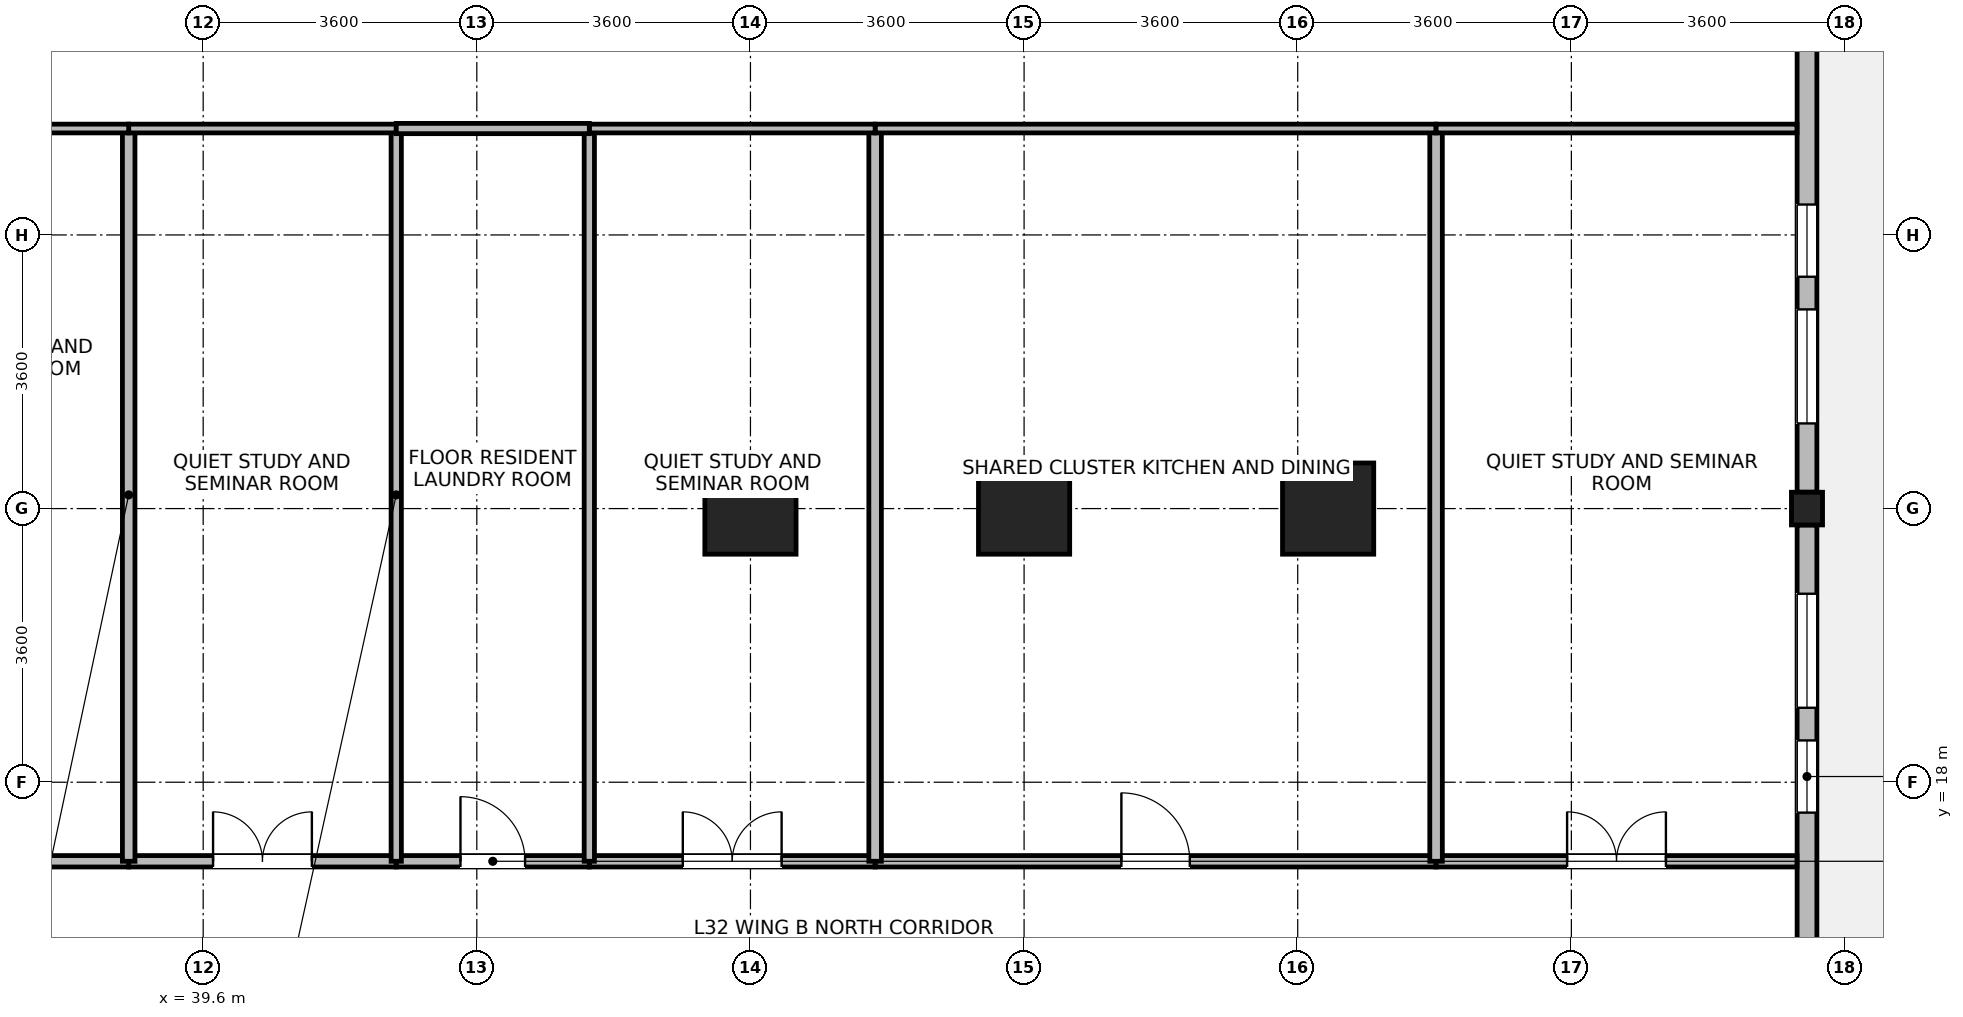
"""IFC4 building model, lengths in metres.
Left out: names, types, materials, properties, quantities, classifications, styles, units other than length and angle.
Written with IfcOpenShell. Run it as: python <this file> out.ifc"""

import sys

from ifc_helpers import new_model, si_unit, direction, frame, frame_2d, origin, origin_2d, place, context, subcontext, project, spatial, rectangle, i_section, extrude, source, transform, mapped, element, fill, save


model = new_model("IFC4")
c1 = context("Model", 3, precision=1e-05, world=origin(), true_north=direction((0.0, 1.0)))
c2 = subcontext(c1, "Body", "Model", "MODEL_VIEW")
j1 = project(units=[si_unit("LENGTHUNIT", "METRE"), si_unit("PLANEANGLEUNIT", "RADIAN")], contexts=[c1])
p1 = place(None, origin())
s1 = spatial("IfcSite", under=j1, at=p1, CompositionType="ELEMENT")
p2 = place(p1, origin())
s2 = spatial("IfcBuilding", under=s1, at=p2, CompositionType="ELEMENT")
p3 = place(p2, frame((0.0, 0.0, 126.7)))
s3 = spatial("IfcBuildingStorey", under=s2, at=p3, CompositionType="ELEMENT", Elevation=126.7)
m1 = source(origin(), c2, "Body", "SweptSolid", [
    extrude(rectangle(XDim=1.2, YDim=1.2, at=origin_2d()), origin(), (0.0, 0.0, 1.0), 3.7),
])
for number, where, z_axis, x_axis in (
    (1, (46.8, 21.6, 0.0), (0.0, 0.0, 1.0), (1.0, 0.0, 0.0)),
    (2, (50.4, 21.6, 0.0), (0.0, 0.0, 1.0), (1.0, 0.0, 0.0)),
    (3, (54.4, 21.6, 0.0), (0.0, 0.0, 1.0), (1.0, 0.0, 0.0)),
):
    element("IfcColumn", number, at=place(p3, frame(where, z_axis=z_axis, x_axis=x_axis)), inside=s3, PredefinedType="COLUMN", context=c2, shape_type="MappedRepresentation", body=[
        mapped(m1, transform((0.0, 0.0, 0.0), x_axis=(1.0, 0.0, 0.0), y_axis=(0.0, 1.0, 0.0), z_axis=(0.0, 0.0, 1.0), scale=1.0)),
    ])
m2 = source(origin(), c2, "Body", "SweptSolid", [
    extrude(i_section(OverallWidth=0.409, OverallDepth=0.43, WebThickness=0.024, FlangeThickness=0.033, FilletRadius=0.015, at=origin_2d()), origin(), (0.0, 0.0, 1.0), 3.7),
])
p4 = place(p3, frame((60.7, 21.6, 0.0), z_axis=(0.0, 0.0, 1.0), x_axis=(1.0, 0.0, 0.0)))
e4 = element("IfcColumn", 4, at=p4, inside=s3, PredefinedType="COLUMN", context=c2, shape_type="MappedRepresentation", body=[
    mapped(m2, transform((0.0, 0.0, 0.0), x_axis=(1.0, 0.0, 0.0), y_axis=(0.0, 1.0, 0.0), z_axis=(0.0, 0.0, 1.0), scale=1.0)),
])
p5 = place(p3, frame((60.7, 21.384, 0.0), z_axis=(0.0, 0.0, 1.0), x_axis=(0.0, -1.0, 0.0)))
e5 = element("IfcWall", 5, at=p5, inside=s3, PredefinedType="STANDARD", context=c2, shape_type="SweptSolid", body=[
    extrude(rectangle(XDim=6.618, YDim=0.26, at=frame_2d((3.309, 0.0))), origin(), (0.0, 0.0, 1.0), 2.87),
])
p6 = place(p5, frame((0.905, 0.0, 0.85)))
e6 = element("IfcOpeningElement", 6, at=p6, cuts=e5, PredefinedType="OPENING", context=c2, shape_type="SweptSolid", body=[
    extrude(rectangle(XDim=1.5, YDim=1.85, at=frame_2d((0.75, 0.925))), frame((0.0, 0.14, 0.0), z_axis=(0.0, -1.0, 0.0), x_axis=(1.0, 0.0, 0.0)), (0.0, 0.0, 1.0), 0.28),
])
p7 = place(p5, frame((2.834, 0.0, 0.85)))
e7 = element("IfcOpeningElement", 7, at=p7, cuts=e5, PredefinedType="OPENING", context=c2, shape_type="SweptSolid", body=[
    extrude(rectangle(XDim=0.95, YDim=1.75, at=frame_2d((0.475, 0.875))), frame((0.0, 0.14, 0.0), z_axis=(0.0, -1.0, 0.0), x_axis=(1.0, 0.0, 0.0)), (0.0, 0.0, 1.0), 0.28),
])
p8 = place(p3, frame((60.7, 28.434, 0.0), z_axis=(0.0, 0.0, 1.0), x_axis=(0.0, -1.0, 0.0)))
e8 = element("IfcWall", 8, at=p8, inside=s3, PredefinedType="STANDARD", context=c2, shape_type="SweptSolid", body=[
    extrude(rectangle(XDim=6.618, YDim=0.26, at=frame_2d((3.309, 0.0))), origin(), (0.0, 0.0, 1.0), 2.87),
])
p9 = place(p8, frame((4.213, 0.0, 0.85)))
e9 = element("IfcOpeningElement", 9, at=p9, cuts=e8, PredefinedType="OPENING", context=c2, shape_type="SweptSolid", body=[
    extrude(rectangle(XDim=1.5, YDim=1.85, at=frame_2d((0.75, 0.925))), frame((0.0, 0.14, 0.0), z_axis=(0.0, -1.0, 0.0), x_axis=(1.0, 0.0, 0.0)), (0.0, 0.0, 1.0), 0.28),
])
p10 = place(p8, frame((2.834, 0.0, 0.85)))
e10 = element("IfcOpeningElement", 10, at=p10, cuts=e8, PredefinedType="OPENING", context=c2, shape_type="SweptSolid", body=[
    extrude(rectangle(XDim=0.95, YDim=1.75, at=frame_2d((0.475, 0.875))), frame((0.0, 0.14, 0.0), z_axis=(0.0, -1.0, 0.0), x_axis=(1.0, 0.0, 0.0)), (0.0, 0.0, 1.0), 0.28),
])
p11 = place(p3, frame((48.44, 16.96, 0.0), z_axis=(0.0, 0.0, 1.0), x_axis=(1.0, 0.0, 0.0)))
e11 = element("IfcWall", 11, at=p11, inside=s3, PredefinedType="PARTITIONING", context=c2, shape_type="SweptSolid", body=[
    extrude(rectangle(XDim=7.38, YDim=0.15, at=frame_2d((3.69, 0.0))), origin(), (0.0, 0.0, 1.0), 3.32),
])
p12 = place(p11, frame((3.24, 0.0, 0.0)))
e12 = element("IfcOpeningElement", 12, at=p12, cuts=e11, PredefinedType="OPENING", context=c2, shape_type="SweptSolid", body=[
    extrude(rectangle(XDim=0.9, YDim=2.08, at=frame_2d((0.45, 1.04))), frame((0.0, 0.085, 0.0), z_axis=(0.0, -1.0, 0.0), x_axis=(1.0, 0.0, 0.0)), (0.0, 0.0, 1.0), 0.17),
])
p13 = place(p3, frame((55.82, 16.96, 0.0), z_axis=(0.0, 0.0, 1.0), x_axis=(1.0, 0.0, 0.0)))
e13 = element("IfcWall", 13, at=p13, inside=s3, PredefinedType="PARTITIONING", context=c2, shape_type="SweptSolid", body=[
    extrude(rectangle(XDim=4.748, YDim=0.15, at=frame_2d((2.374, 0.0))), origin(), (0.0, 0.0, 1.0), 3.32),
])
p14 = place(p13, frame((1.724, 0.0, 0.0)))
e14 = element("IfcOpeningElement", 14, at=p14, cuts=e13, PredefinedType="OPENING", context=c2, shape_type="SweptSolid", body=[
    extrude(rectangle(XDim=1.3, YDim=2.12, at=frame_2d((0.65, 1.06))), frame((0.0, 0.085, 0.0), z_axis=(0.0, -1.0, 0.0), x_axis=(1.0, 0.0, 0.0)), (0.0, 0.0, 1.0), 0.17),
])
p15 = place(p3, frame((44.68, 16.96, 0.0), z_axis=(0.0, 0.0, 1.0), x_axis=(1.0, 0.0, 0.0)))
e15 = element("IfcWall", 15, at=p15, inside=s3, PredefinedType="PARTITIONING", context=c2, shape_type="SweptSolid", body=[
    extrude(rectangle(XDim=3.76, YDim=0.15, at=frame_2d((1.88, 0.0))), origin(), (0.0, 0.0, 1.0), 3.32),
])
p16 = place(p15, frame((1.23, 0.0, 0.0)))
e16 = element("IfcOpeningElement", 16, at=p16, cuts=e15, PredefinedType="OPENING", context=c2, shape_type="SweptSolid", body=[
    extrude(rectangle(XDim=1.3, YDim=2.12, at=frame_2d((0.65, 1.06))), frame((0.0, 0.085, 0.0), z_axis=(0.0, -1.0, 0.0), x_axis=(1.0, 0.0, 0.0)), (0.0, 0.0, 1.0), 0.17),
])
p17 = place(p3, frame((38.62, 16.96, 0.0), z_axis=(0.0, 0.0, 1.0), x_axis=(1.0, 0.0, 0.0)))
e17 = element("IfcWall", 17, at=p17, inside=s3, PredefinedType="PARTITIONING", context=c2, shape_type="SweptSolid", body=[
    extrude(rectangle(XDim=3.52, YDim=0.15, at=frame_2d((1.76, 0.0))), origin(), (0.0, 0.0, 1.0), 3.32),
])
p18 = place(p17, frame((1.11, 0.0, 0.0)))
e18 = element("IfcOpeningElement", 18, at=p18, cuts=e17, PredefinedType="OPENING", context=c2, shape_type="SweptSolid", body=[
    extrude(rectangle(XDim=1.3, YDim=2.12, at=frame_2d((0.65, 1.06))), frame((0.0, 0.085, 0.0), z_axis=(0.0, -1.0, 0.0), x_axis=(1.0, 0.0, 0.0)), (0.0, 0.0, 1.0), 0.17),
])
p19 = place(p3, frame((35.36, 16.96, 0.0), z_axis=(0.0, 0.0, 1.0), x_axis=(1.0, 0.0, 0.0)))
e19 = element("IfcWall", 19, at=p19, inside=s3, PredefinedType="PARTITIONING", context=c2, shape_type="SweptSolid", body=[
    extrude(rectangle(XDim=3.26, YDim=0.15, at=frame_2d((1.63, 0.0))), origin(), (0.0, 0.0, 1.0), 3.32),
])
p20 = place(p3, frame((42.14, 16.96, 0.0), z_axis=(0.0, 0.0, 1.0), x_axis=(1.0, 0.0, 0.0)))
e20 = element("IfcWall", 20, at=p20, inside=s3, PredefinedType="PARTITIONING", context=c2, shape_type="SweptSolid", body=[
    extrude(rectangle(XDim=2.54, YDim=0.15, at=frame_2d((1.27, 0.0))), origin(), (0.0, 0.0, 1.0), 3.32),
])
p21 = place(p20, frame((0.845, 0.0, 0.0)))
e21 = element("IfcOpeningElement", 21, at=p21, cuts=e20, PredefinedType="OPENING", context=c2, shape_type="SweptSolid", body=[
    extrude(rectangle(XDim=0.85, YDim=2.04, at=frame_2d((0.425, 1.02))), frame((0.0, 0.085, 0.0), z_axis=(0.0, -1.0, 0.0), x_axis=(1.0, 0.0, 0.0)), (0.0, 0.0, 1.0), 0.17),
])
p22 = place(p3, frame((38.62, 16.96, 0.0), z_axis=(0.0, 0.0, 1.0), x_axis=(0.0, 1.0, 0.0)))
e22 = element("IfcWall", 22, at=p22, inside=s3, PredefinedType="PARTITIONING", context=c2, shape_type="SweptSolid", body=[
    extrude(rectangle(XDim=9.64, YDim=0.165, at=frame_2d((4.82, 0.0))), origin(), (0.0, 0.0, 1.0), 3.32),
])
for number, where, z_axis, x_axis in (
    (23, (42.14, 16.96, 0.0), (0.0, 0.0, 1.0), (0.0, 1.0, 0.0)),
    (24, (44.68, 16.96, 0.0), (0.0, 0.0, 1.0), (0.0, 1.0, 0.0)),
):
    element("IfcWall", number, at=place(p3, frame(where, z_axis=z_axis, x_axis=x_axis)), inside=s3, PredefinedType="PARTITIONING", context=c2, shape_type="SweptSolid", body=[
        extrude(rectangle(XDim=9.64, YDim=0.135, at=frame_2d((4.82, 0.0))), origin(), (0.0, 0.0, 1.0), 3.32),
    ])
for number, where, z_axis, x_axis in (
    (25, (48.44, 16.96, 0.0), (0.0, 0.0, 1.0), (0.0, 1.0, 0.0)),
    (26, (55.82, 16.96, 0.0), (0.0, 0.0, 1.0), (0.0, 1.0, 0.0)),
):
    element("IfcWall", number, at=place(p3, frame(where, z_axis=z_axis, x_axis=x_axis)), inside=s3, PredefinedType="PARTITIONING", context=c2, shape_type="SweptSolid", body=[
        extrude(rectangle(XDim=9.64, YDim=0.165, at=frame_2d((4.82, 0.0))), origin(), (0.0, 0.0, 1.0), 3.32),
    ])
p23 = place(p3, frame((48.44, 26.6, 0.0), z_axis=(0.0, 0.0, 1.0), x_axis=(1.0, 0.0, 0.0)))
e27 = element("IfcWall", 27, at=p23, inside=s3, PredefinedType="PARTITIONING", context=c2, shape_type="SweptSolid", body=[
    extrude(rectangle(XDim=7.38, YDim=0.115, at=frame_2d((3.69, 0.0))), origin(), (0.0, 0.0, 1.0), 3.32),
])
p24 = place(p3, frame((55.82, 26.6, 0.0), z_axis=(0.0, 0.0, 1.0), x_axis=(1.0, 0.0, 0.0)))
e28 = element("IfcWall", 28, at=p24, inside=s3, PredefinedType="PARTITIONING", context=c2, shape_type="SweptSolid", body=[
    extrude(rectangle(XDim=4.748, YDim=0.115, at=frame_2d((2.374, 0.0))), origin(), (0.0, 0.0, 1.0), 3.32),
])
p25 = place(p3, frame((44.68, 26.6, 0.0), z_axis=(0.0, 0.0, 1.0), x_axis=(1.0, 0.0, 0.0)))
e29 = element("IfcWall", 29, at=p25, inside=s3, PredefinedType="PARTITIONING", context=c2, shape_type="SweptSolid", body=[
    extrude(rectangle(XDim=3.76, YDim=0.115, at=frame_2d((1.88, 0.0))), origin(), (0.0, 0.0, 1.0), 3.32),
])
p26 = place(p3, frame((38.62, 26.6, 0.0), z_axis=(0.0, 0.0, 1.0), x_axis=(1.0, 0.0, 0.0)))
e30 = element("IfcWall", 30, at=p26, inside=s3, PredefinedType="PARTITIONING", context=c2, shape_type="SweptSolid", body=[
    extrude(rectangle(XDim=3.52, YDim=0.115, at=frame_2d((1.76, 0.0))), origin(), (0.0, 0.0, 1.0), 3.32),
])
p27 = place(p3, frame((35.36, 26.6, 0.0), z_axis=(0.0, 0.0, 1.0), x_axis=(1.0, 0.0, 0.0)))
e31 = element("IfcWall", 31, at=p27, inside=s3, PredefinedType="PARTITIONING", context=c2, shape_type="SweptSolid", body=[
    extrude(rectangle(XDim=3.26, YDim=0.115, at=frame_2d((1.63, 0.0))), origin(), (0.0, 0.0, 1.0), 3.32),
])
p28 = place(p3, frame((42.14, 26.6, 0.0), z_axis=(0.0, 0.0, 1.0), x_axis=(1.0, 0.0, 0.0)))
e32 = element("IfcWall", 32, at=p28, inside=s3, PredefinedType="PARTITIONING", context=c2, shape_type="SweptSolid", body=[
    extrude(rectangle(XDim=2.54, YDim=0.135, at=frame_2d((1.27, 0.0))), origin(), (0.0, 0.0, 1.0), 3.32),
])
p29 = place(p6, origin())
e33 = element("IfcWindow", 33, at=p29, inside=s3, PartitioningType="SINGLE_PANEL", PredefinedType="WINDOW", context=c2, shape_type="SweptSolid", body=[
    extrude(rectangle(XDim=1.5, YDim=1.85, at=frame_2d((0.75, 0.925))), frame((0.0, 0.03, 0.0), z_axis=(0.0, -1.0, 0.0), x_axis=(1.0, 0.0, 0.0)), (0.0, 0.0, 1.0), 0.06),
])
fill(e6, e33)
p30 = place(p7, origin())
e34 = element("IfcWindow", 34, at=p30, inside=s3, PartitioningType="SINGLE_PANEL", PredefinedType="WINDOW", context=c2, shape_type="SweptSolid", body=[
    extrude(rectangle(XDim=0.95, YDim=1.75, at=frame_2d((0.475, 0.875))), frame((0.0, 0.03, 0.0), z_axis=(0.0, -1.0, 0.0), x_axis=(1.0, 0.0, 0.0)), (0.0, 0.0, 1.0), 0.06),
])
fill(e7, e34)
p31 = place(p9, origin())
e35 = element("IfcWindow", 35, at=p31, inside=s3, PartitioningType="SINGLE_PANEL", PredefinedType="WINDOW", context=c2, shape_type="SweptSolid", body=[
    extrude(rectangle(XDim=1.5, YDim=1.85, at=frame_2d((0.75, 0.925))), frame((0.0, 0.03, 0.0), z_axis=(0.0, -1.0, 0.0), x_axis=(1.0, 0.0, 0.0)), (0.0, 0.0, 1.0), 0.06),
])
fill(e9, e35)
p32 = place(p10, origin())
e36 = element("IfcWindow", 36, at=p32, inside=s3, PartitioningType="SINGLE_PANEL", PredefinedType="WINDOW", context=c2, shape_type="SweptSolid", body=[
    extrude(rectangle(XDim=0.95, YDim=1.75, at=frame_2d((0.475, 0.875))), frame((0.0, 0.03, 0.0), z_axis=(0.0, -1.0, 0.0), x_axis=(1.0, 0.0, 0.0)), (0.0, 0.0, 1.0), 0.06),
])
fill(e10, e36)
p33 = place(p12, origin())
e37 = element("IfcDoor", 37, at=p33, inside=s3, OperationType="SINGLE_SWING_LEFT", PredefinedType="DOOR", context=c2, shape_type="SweptSolid", body=[
    extrude(rectangle(XDim=0.9, YDim=2.08, at=frame_2d((0.45, 1.04))), frame((0.0, 0.025, 0.0), z_axis=(0.0, -1.0, 0.0), x_axis=(1.0, 0.0, 0.0)), (0.0, 0.0, 1.0), 0.05),
])
fill(e12, e37)
p34 = place(p14, origin())
e38 = element("IfcDoor", 38, at=p34, inside=s3, OperationType="DOUBLE_DOOR_SINGLE_SWING", PredefinedType="DOOR", context=c2, shape_type="SweptSolid", body=[
    extrude(rectangle(XDim=1.3, YDim=2.12, at=frame_2d((0.65, 1.06))), frame((0.0, 0.025, 0.0), z_axis=(0.0, -1.0, 0.0), x_axis=(1.0, 0.0, 0.0)), (0.0, 0.0, 1.0), 0.05),
])
fill(e14, e38)
p35 = place(p16, origin())
e39 = element("IfcDoor", 39, at=p35, inside=s3, OperationType="DOUBLE_DOOR_SINGLE_SWING", PredefinedType="DOOR", context=c2, shape_type="SweptSolid", body=[
    extrude(rectangle(XDim=1.3, YDim=2.12, at=frame_2d((0.65, 1.06))), frame((0.0, 0.025, 0.0), z_axis=(0.0, -1.0, 0.0), x_axis=(1.0, 0.0, 0.0)), (0.0, 0.0, 1.0), 0.05),
])
fill(e16, e39)
p36 = place(p18, origin())
e40 = element("IfcDoor", 40, at=p36, inside=s3, OperationType="DOUBLE_DOOR_SINGLE_SWING", PredefinedType="DOOR", context=c2, shape_type="SweptSolid", body=[
    extrude(rectangle(XDim=1.3, YDim=2.12, at=frame_2d((0.65, 1.06))), frame((0.0, 0.025, 0.0), z_axis=(0.0, -1.0, 0.0), x_axis=(1.0, 0.0, 0.0)), (0.0, 0.0, 1.0), 0.05),
])
fill(e18, e40)
p37 = place(p21, origin())
e41 = element("IfcDoor", 41, at=p37, inside=s3, OperationType="SINGLE_SWING_LEFT", PredefinedType="DOOR", context=c2, shape_type="SweptSolid", body=[
    extrude(rectangle(XDim=0.85, YDim=2.04, at=frame_2d((0.425, 1.02))), frame((0.0, 0.025, 0.0), z_axis=(0.0, -1.0, 0.0), x_axis=(1.0, 0.0, 0.0)), (0.0, 0.0, 1.0), 0.05),
])
fill(e21, e41)
save(model, sys.argv[1])
